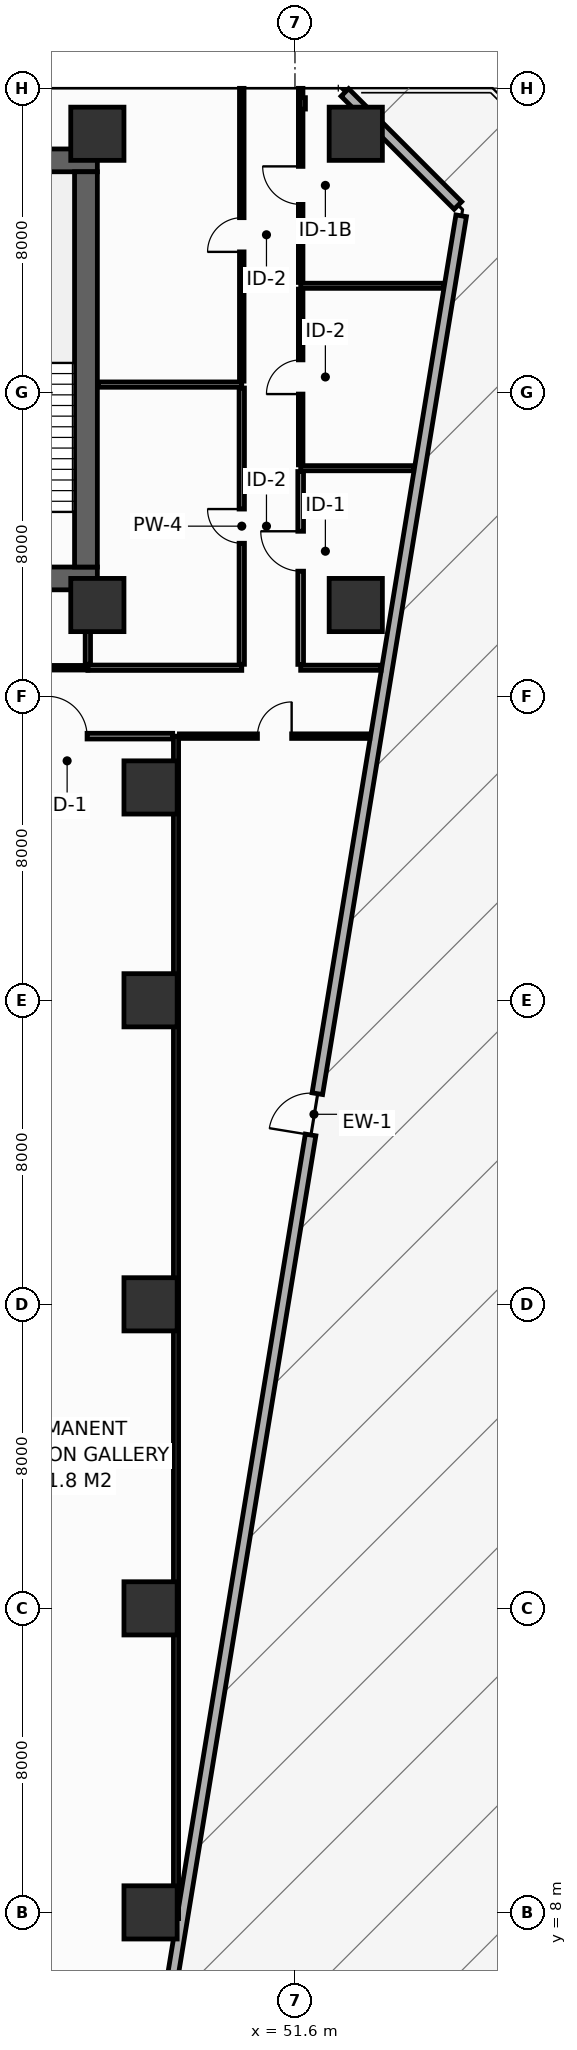
"""IFC4 building model, lengths in metres.
Left out: names, types, materials, properties, quantities, classifications, styles, units other than length and angle.
Written with IfcOpenShell. Run it as: python <this file> out.ifc"""

import sys

from ifc_helpers import new_model, si_unit, direction, frame, frame_2d, origin, origin_2d, place, context, subcontext, project, spatial, rectangle, hollow_rectangle, extrude, element, fill, save


model = new_model("IFC4")
c1 = context("Model", 3, precision=1e-05, world=origin(), true_north=direction((0.0, 1.0)))
c2 = subcontext(c1, "Body", "Model", "MODEL_VIEW")
j1 = project(units=[si_unit("LENGTHUNIT", "METRE"), si_unit("PLANEANGLEUNIT", "RADIAN")], contexts=[c1])
p1 = place(None, origin())
s1 = spatial("IfcSite", under=j1, at=p1, CompositionType="ELEMENT")
p2 = place(p1, origin())
s2 = spatial("IfcBuilding", under=s1, at=p2, CompositionType="ELEMENT")
p3 = place(p2, frame((0.0, 0.0, 27.6)))
s3 = spatial("IfcBuildingStorey", under=s2, at=p3, CompositionType="ELEMENT", Elevation=27.6)
p4 = place(p3, frame((13.5, 43.1, 0.0), z_axis=(0.0, 0.0, 1.0), x_axis=(1.0, 0.0, 0.0)))
e1 = element("IfcWall", 1, at=p4, inside=s3, PredefinedType="SHEAR", context=c2, shape_type="SweptSolid", body=[
    extrude(rectangle(XDim=32.9, YDim=0.6, at=frame_2d((16.45, 0.0))), origin(), (0.0, 0.0, 1.0), 5.15),
])
p5 = place(p4, frame((5.4, 0.0, 0.0)))
e2 = element("IfcOpeningElement", 2, at=p5, cuts=e1, PredefinedType="OPENING", context=c2, shape_type="SweptSolid", body=[
    extrude(rectangle(XDim=1.1, YDim=2.15, at=frame_2d((0.55, 1.075))), frame((0.0, 0.31, 0.0), z_axis=(0.0, -1.0, 0.0), x_axis=(1.0, 0.0, 0.0)), (0.0, 0.0, 1.0), 0.62),
])
p6 = place(p4, frame((25.6, 0.0, 0.0)))
e3 = element("IfcOpeningElement", 3, at=p6, cuts=e1, PredefinedType="OPENING", context=c2, shape_type="SweptSolid", body=[
    extrude(rectangle(XDim=1.1, YDim=2.15, at=frame_2d((0.55, 1.075))), frame((0.0, 0.31, 0.0), z_axis=(0.0, -1.0, 0.0), x_axis=(1.0, 0.0, 0.0)), (0.0, 0.0, 1.0), 0.62),
])
p7 = place(p3, frame((13.5, 54.1, 0.0), z_axis=(0.0, 0.0, 1.0), x_axis=(1.0, 0.0, 0.0)))
e4 = element("IfcWall", 4, at=p7, inside=s3, PredefinedType="SHEAR", context=c2, shape_type="SweptSolid", body=[
    extrude(rectangle(XDim=32.9, YDim=0.6, at=frame_2d((16.45, 0.0))), origin(), (0.0, 0.0, 1.0), 5.15),
])
p8 = place(p3, frame((46.1, 43.4, 0.0), z_axis=(0.0, 0.0, 1.0), x_axis=(0.0, 1.0, 0.0)))
e5 = element("IfcWall", 5, at=p8, inside=s3, PredefinedType="SHEAR", context=c2, shape_type="SweptSolid", body=[
    extrude(rectangle(XDim=10.4, YDim=0.6, at=frame_2d((5.2, 0.0))), origin(), (0.0, 0.0, 1.0), 5.15),
])
for number, where, z_axis, x_axis in (
    (6, (46.4, 54.8, 0.0), (0.0, 0.0, 1.0), (1.0, 0.0, 0.0)),
    (7, (53.2, 54.8, 0.0), (0.0, 0.0, 1.0), (1.0, 0.0, 0.0)),
    (8, (46.4, 42.4, 0.0), (0.0, 0.0, 1.0), (1.0, 0.0, 0.0)),
    (9, (53.2, 42.4, 0.0), (0.0, 0.0, 1.0), (1.0, 0.0, 0.0)),
    (10, (47.8, 8.0, 0.0), (0.0, 0.0, 1.0), (1.0, 0.0, 0.0)),
    (11, (47.8, 16.0, 0.0), (0.0, 0.0, 1.0), (1.0, 0.0, 0.0)),
    (12, (47.8, 24.0, 0.0), (0.0, 0.0, 1.0), (1.0, 0.0, 0.0)),
    (13, (47.8, 32.0, 0.0), (0.0, 0.0, 1.0), (1.0, 0.0, 0.0)),
    (14, (47.8, 37.6, 0.0), (0.0, 0.0, 1.0), (1.0, 0.0, 0.0)),
):
    element("IfcColumn", number, at=place(p3, frame(where, z_axis=z_axis, x_axis=x_axis)), inside=s3, PredefinedType="COLUMN", context=c2, shape_type="SweptSolid", body=[
        extrude(hollow_rectangle(XDim=1.4, YDim=1.4, WallThickness=0.065, at=origin_2d()), origin(), (0.0, 0.0, 1.0), 5.4),
    ])
p9 = place(p3, frame((51.8, 55.6, 0.0), z_axis=(0.0, 0.0, 1.0), x_axis=(1.0, 0.0, 0.0)))
e15 = element("IfcColumn", 15, at=p9, inside=s3, PredefinedType="PILASTER", context=c2, shape_type="SweptSolid", body=[
    extrude(hollow_rectangle(XDim=0.15, YDim=0.3, WallThickness=0.01, at=origin_2d()), origin(), (0.0, 0.0, 1.0), 5.4),
])
p10 = place(p3, frame((48.226, 5.358, 0.0), z_axis=(0.0, 0.0, 1.0), x_axis=(0.161709707857, 0.986838370953, 0.0)))
e16 = element("IfcWall", 16, at=p10, inside=s3, PredefinedType="STANDARD", context=c2, shape_type="SweptSolid", body=[
    extrude(rectangle(XDim=47.915, YDim=0.28, at=frame_2d((23.958, 0.0))), origin(), (0.0, 0.0, 1.0), 5.15),
])
p11 = place(p10, frame((23.407, 0.0, 0.0)))
e17 = element("IfcOpeningElement", 17, at=p11, cuts=e16, PredefinedType="OPENING", context=c2, shape_type="SweptSolid", body=[
    extrude(rectangle(XDim=1.1, YDim=2.2, at=frame_2d((0.55, 1.1))), frame((0.0, 0.15, 0.0), z_axis=(0.0, -1.0, 0.0), x_axis=(1.0, 0.0, 0.0)), (0.0, 0.0, 1.0), 0.3),
])
p12 = place(p3, frame((55.887, 52.913, 0.0), z_axis=(0.0, 0.0, 1.0), x_axis=(-0.707106781187, 0.707106781187, 0.0)))
e18 = element("IfcWall", 18, at=p12, inside=s3, PredefinedType="STANDARD", context=c2, shape_type="SweptSolid", body=[
    extrude(rectangle(XDim=4.206, YDim=0.28, at=frame_2d((2.103, 0.0))), origin(), (0.0, 0.0, 1.0), 5.15),
])
p13 = place(p3, frame((46.15, 40.75, 0.0), z_axis=(0.0, 0.0, 1.0), x_axis=(1.0, 0.0, 0.0)))
e19 = element("IfcWall", 19, at=p13, inside=s3, PredefinedType="PARTITIONING", context=c2, shape_type="SweptSolid", body=[
    extrude(rectangle(XDim=4.05, YDim=0.14, at=frame_2d((2.025, 0.0))), origin(), (0.0, 0.0, 1.0), 5.15),
])
p14 = place(p3, frame((46.15, 40.84, 0.0), z_axis=(0.0, 0.0, 1.0), x_axis=(0.0, 1.0, 0.0)))
e20 = element("IfcWall", 20, at=p14, inside=s3, PredefinedType="PARTITIONING", context=c2, shape_type="SweptSolid", body=[
    extrude(rectangle(XDim=1.94, YDim=0.14, at=frame_2d((0.97, 0.0))), origin(), (0.0, 0.0, 1.0), 5.15),
])
p15 = place(p3, frame((46.42, 48.2, 0.0), z_axis=(0.0, 0.0, 1.0), x_axis=(1.0, 0.0, 0.0)))
e21 = element("IfcWall", 21, at=p15, inside=s3, PredefinedType="PARTITIONING", context=c2, shape_type="SweptSolid", body=[
    extrude(rectangle(XDim=3.78, YDim=0.14, at=frame_2d((1.89, 0.0))), origin(), (0.0, 0.0, 1.0), 5.15),
])
p16 = place(p3, frame((50.2, 40.84, 0.0), z_axis=(0.0, 0.0, 1.0), x_axis=(0.0, 1.0, 0.0)))
e22 = element("IfcWall", 22, at=p16, inside=s3, PredefinedType="PARTITIONING", context=c2, shape_type="SweptSolid", body=[
    extrude(rectangle(XDim=7.27, YDim=0.14, at=frame_2d((3.635, 0.0))), origin(), (0.0, 0.0, 1.0), 4.335),
])
p17 = place(p16, frame((3.185, 0.0, 0.0)))
e23 = element("IfcOpeningElement", 23, at=p17, cuts=e22, PredefinedType="OPENING", context=c2, shape_type="SweptSolid", body=[
    extrude(rectangle(XDim=0.9, YDim=2.1, at=frame_2d((0.45, 1.05))), frame((0.0, 0.08, 0.0), z_axis=(0.0, -1.0, 0.0), x_axis=(1.0, 0.0, 0.0)), (0.0, 0.0, 1.0), 0.16),
])
p18 = place(p3, frame((50.2, 48.29, 0.0), z_axis=(0.0, 0.0, 1.0), x_axis=(0.0, 1.0, 0.0)))
e24 = element("IfcWall", 24, at=p18, inside=s3, PredefinedType="PARTITIONING", context=c2, shape_type="SweptSolid", body=[
    extrude(rectangle(XDim=7.705, YDim=0.12, at=frame_2d((3.853, 0.0))), origin(), (0.0, 0.0, 1.0), 4.435),
])
p19 = place(p18, frame((3.402, 0.0, 0.0)))
e25 = element("IfcOpeningElement", 25, at=p19, cuts=e24, PredefinedType="OPENING", context=c2, shape_type="SweptSolid", body=[
    extrude(rectangle(XDim=0.9, YDim=2.1, at=frame_2d((0.45, 1.05))), frame((0.0, 0.07, 0.0), z_axis=(0.0, -1.0, 0.0), x_axis=(1.0, 0.0, 0.0)), (0.0, 0.0, 1.0), 0.14),
])
p20 = place(p3, frame((51.75, 40.75, 0.0), z_axis=(0.0, 0.0, 1.0), x_axis=(1.0, 0.0, 0.0)))
e26 = element("IfcWall", 26, at=p20, inside=s3, PredefinedType="PARTITIONING", context=c2, shape_type="SweptSolid", body=[
    extrude(rectangle(XDim=2.113, YDim=0.135, at=frame_2d((1.057, 0.0))), origin(), (0.0, 0.0, 1.0), 5.15),
])
p21 = place(p3, frame((51.75, 46.0, 0.0), z_axis=(0.0, 0.0, 1.0), x_axis=(1.0, 0.0, 0.0)))
e27 = element("IfcWall", 27, at=p21, inside=s3, PredefinedType="PARTITIONING", context=c2, shape_type="SweptSolid", body=[
    extrude(rectangle(XDim=2.974, YDim=0.135, at=frame_2d((1.487, 0.0))), origin(), (0.0, 0.0, 1.0), 4.335),
])
p22 = place(p3, frame((51.75, 50.8, 0.0), z_axis=(0.0, 0.0, 1.0), x_axis=(1.0, 0.0, 0.0)))
e28 = element("IfcWall", 28, at=p22, inside=s3, PredefinedType="PARTITIONING", context=c2, shape_type="SweptSolid", body=[
    extrude(rectangle(XDim=3.76, YDim=0.135, at=frame_2d((1.88, 0.0))), origin(), (0.0, 0.0, 1.0), 4.335),
])
p23 = place(p3, frame((51.75, 40.837, 0.0), z_axis=(0.0, 0.0, 1.0), x_axis=(0.0, 1.0, 0.0)))
e29 = element("IfcWall", 29, at=p23, inside=s3, PredefinedType="PARTITIONING", context=c2, shape_type="SweptSolid", body=[
    extrude(rectangle(XDim=5.075, YDim=0.15, at=frame_2d((2.538, 0.0))), origin(), (0.0, 0.0, 1.0), 4.235),
])
p24 = place(p23, frame((2.453, 0.0, 0.0)))
e30 = element("IfcOpeningElement", 30, at=p24, cuts=e29, PredefinedType="OPENING", context=c2, shape_type="SweptSolid", body=[
    extrude(rectangle(XDim=1.05, YDim=2.15, at=frame_2d((0.525, 1.075))), frame((0.0, 0.085, 0.0), z_axis=(0.0, -1.0, 0.0), x_axis=(1.0, 0.0, 0.0)), (0.0, 0.0, 1.0), 0.17),
])
p25 = place(p3, frame((51.75, 46.087, 0.0), z_axis=(0.0, 0.0, 1.0), x_axis=(0.0, 1.0, 0.0)))
e31 = element("IfcWall", 31, at=p25, inside=s3, PredefinedType="PARTITIONING", context=c2, shape_type="SweptSolid", body=[
    extrude(rectangle(XDim=4.625, YDim=0.12, at=frame_2d((2.312, 0.0))), origin(), (0.0, 0.0, 1.0), 5.15),
])
p26 = place(p25, frame((1.863, 0.0, 0.0)))
e32 = element("IfcOpeningElement", 32, at=p26, cuts=e31, PredefinedType="OPENING", context=c2, shape_type="SweptSolid", body=[
    extrude(rectangle(XDim=0.9, YDim=2.1, at=frame_2d((0.45, 1.05))), frame((0.0, 0.07, 0.0), z_axis=(0.0, -1.0, 0.0), x_axis=(1.0, 0.0, 0.0)), (0.0, 0.0, 1.0), 0.14),
])
p27 = place(p3, frame((51.75, 50.887, 0.0), z_axis=(0.0, 0.0, 1.0), x_axis=(0.0, 1.0, 0.0)))
e33 = element("IfcWall", 33, at=p27, inside=s3, PredefinedType="PARTITIONING", context=c2, shape_type="SweptSolid", body=[
    extrude(rectangle(XDim=5.108, YDim=0.12, at=frame_2d((2.554, 0.0))), origin(), (0.0, 0.0, 1.0), 4.435),
])
p28 = place(p27, frame((2.054, 0.0, 0.0)))
e34 = element("IfcOpeningElement", 34, at=p28, cuts=e33, PredefinedType="OPENING", context=c2, shape_type="SweptSolid", body=[
    extrude(rectangle(XDim=1.0, YDim=2.15, at=frame_2d((0.5, 1.075))), frame((0.0, 0.07, 0.0), z_axis=(0.0, -1.0, 0.0), x_axis=(1.0, 0.0, 0.0)), (0.0, 0.0, 1.0), 0.14),
])
p29 = place(p3, frame((40.995, 40.75, 0.0), z_axis=(0.0, 0.0, 1.0), x_axis=(1.0, 0.0, 0.0)))
e35 = element("IfcWall", 35, at=p29, inside=s3, PredefinedType="PARTITIONING", context=c2, shape_type="SweptSolid", body=[
    extrude(rectangle(XDim=5.155, YDim=0.12, at=frame_2d((2.577, 0.0))), origin(), (0.0, 0.0, 1.0), 5.15),
])
p30 = place(p29, frame((2.128, 0.0, 0.0)))
e36 = element("IfcOpeningElement", 36, at=p30, cuts=e35, PredefinedType="OPENING", context=c2, shape_type="SweptSolid", body=[
    extrude(rectangle(XDim=0.9, YDim=2.1, at=frame_2d((0.45, 1.05))), frame((0.0, 0.07, 0.0), z_axis=(0.0, -1.0, 0.0), x_axis=(1.0, 0.0, 0.0)), (0.0, 0.0, 1.0), 0.14),
])
p31 = place(p3, frame((48.47, 7.837, 0.0), z_axis=(0.0, 0.0, 1.0), x_axis=(0.0, 1.0, 0.0)))
e37 = element("IfcWall", 37, at=p31, inside=s3, PredefinedType="PARTITIONING", context=c2, shape_type="SweptSolid", body=[
    extrude(rectangle(XDim=31.113, YDim=0.135, at=frame_2d((15.557, 0.0))), origin(), (0.0, 0.0, 1.0), 4.235),
])
p32 = place(p3, frame((42.827, 38.95, 0.0), z_axis=(0.0, 0.0, 1.0), x_axis=(1.0, 0.0, 0.0)))
e38 = element("IfcWall", 38, at=p32, inside=s3, PredefinedType="PARTITIONING", context=c2, shape_type="SweptSolid", body=[
    extrude(rectangle(XDim=5.555, YDim=0.15, at=frame_2d((2.778, 0.0))), origin(), (0.0, 0.0, 1.0), 5.15),
])
p33 = place(p32, frame((2.252, 0.0, 0.0)))
e39 = element("IfcOpeningElement", 39, at=p33, cuts=e38, PredefinedType="OPENING", context=c2, shape_type="SweptSolid", body=[
    extrude(rectangle(XDim=1.05, YDim=2.15, at=frame_2d((0.525, 1.075))), frame((0.0, 0.085, 0.0), z_axis=(0.0, -1.0, 0.0), x_axis=(1.0, 0.0, 0.0)), (0.0, 0.0, 1.0), 0.17),
])
p34 = place(p3, frame((48.558, 38.95, 0.0), z_axis=(0.0, 0.0, 1.0), x_axis=(1.0, 0.0, 0.0)))
e40 = element("IfcWall", 40, at=p34, inside=s3, PredefinedType="PARTITIONING", context=c2, shape_type="SweptSolid", body=[
    extrude(rectangle(XDim=5.011, YDim=0.12, at=frame_2d((2.505, 0.0))), origin(), (0.0, 0.0, 1.0), 4.235),
])
p35 = place(p34, frame((2.055, 0.0, 0.0)))
e41 = element("IfcOpeningElement", 41, at=p35, cuts=e40, PredefinedType="OPENING", context=c2, shape_type="SweptSolid", body=[
    extrude(rectangle(XDim=0.9, YDim=2.1, at=frame_2d((0.45, 1.05))), frame((0.0, 0.07, 0.0), z_axis=(0.0, -1.0, 0.0), x_axis=(1.0, 0.0, 0.0)), (0.0, 0.0, 1.0), 0.14),
])
p36 = place(p11, origin())
e42 = element("IfcDoor", 42, at=p36, inside=s3, OperationType="SINGLE_SWING_LEFT", PredefinedType="DOOR", context=c2, shape_type="SweptSolid", body=[
    extrude(rectangle(XDim=1.1, YDim=2.2, at=frame_2d((0.55, 1.1))), frame((0.0, 0.025, 0.0), z_axis=(0.0, -1.0, 0.0), x_axis=(1.0, 0.0, 0.0)), (0.0, 0.0, 1.0), 0.05),
])
fill(e17, e42)
p37 = place(p17, origin())
e43 = element("IfcDoor", 43, at=p37, inside=s3, OperationType="SINGLE_SWING_RIGHT", PredefinedType="DOOR", context=c2, shape_type="SweptSolid", body=[
    extrude(rectangle(XDim=0.9, YDim=2.1, at=frame_2d((0.45, 1.05))), frame((0.0, 0.025, 0.0), z_axis=(0.0, -1.0, 0.0), x_axis=(1.0, 0.0, 0.0)), (0.0, 0.0, 1.0), 0.05),
])
fill(e23, e43)
p38 = place(p19, origin())
e44 = element("IfcDoor", 44, at=p38, inside=s3, OperationType="SINGLE_SWING_LEFT", PredefinedType="DOOR", context=c2, shape_type="SweptSolid", body=[
    extrude(rectangle(XDim=0.9, YDim=2.1, at=frame_2d((0.45, 1.05))), frame((0.0, 0.025, 0.0), z_axis=(0.0, -1.0, 0.0), x_axis=(1.0, 0.0, 0.0)), (0.0, 0.0, 1.0), 0.05),
])
fill(e25, e44)
p39 = place(p24, origin())
e45 = element("IfcDoor", 45, at=p39, inside=s3, OperationType="SINGLE_SWING_RIGHT", PredefinedType="DOOR", context=c2, shape_type="SweptSolid", body=[
    extrude(rectangle(XDim=1.05, YDim=2.15, at=frame_2d((0.525, 1.075))), frame((0.0, 0.025, 0.0), z_axis=(0.0, -1.0, 0.0), x_axis=(1.0, 0.0, 0.0)), (0.0, 0.0, 1.0), 0.05),
])
fill(e30, e45)
p40 = place(p26, origin())
e46 = element("IfcDoor", 46, at=p40, inside=s3, OperationType="SINGLE_SWING_LEFT", PredefinedType="DOOR", context=c2, shape_type="SweptSolid", body=[
    extrude(rectangle(XDim=0.9, YDim=2.1, at=frame_2d((0.45, 1.05))), frame((0.0, 0.025, 0.0), z_axis=(0.0, -1.0, 0.0), x_axis=(1.0, 0.0, 0.0)), (0.0, 0.0, 1.0), 0.05),
])
fill(e32, e46)
p41 = place(p28, origin())
e47 = element("IfcDoor", 47, at=p41, inside=s3, OperationType="SINGLE_SWING_RIGHT", PredefinedType="DOOR", context=c2, shape_type="SweptSolid", body=[
    extrude(rectangle(XDim=1.0, YDim=2.15, at=frame_2d((0.5, 1.075))), frame((0.0, 0.025, 0.0), z_axis=(0.0, -1.0, 0.0), x_axis=(1.0, 0.0, 0.0)), (0.0, 0.0, 1.0), 0.05),
])
fill(e34, e47)
p42 = place(p33, origin())
e48 = element("IfcDoor", 48, at=p42, inside=s3, OperationType="SINGLE_SWING_LEFT", PredefinedType="DOOR", context=c2, shape_type="SweptSolid", body=[
    extrude(rectangle(XDim=1.05, YDim=2.15, at=frame_2d((0.525, 1.075))), frame((0.0, 0.025, 0.0), z_axis=(0.0, -1.0, 0.0), x_axis=(1.0, 0.0, 0.0)), (0.0, 0.0, 1.0), 0.05),
])
fill(e39, e48)
p43 = place(p35, origin())
e49 = element("IfcDoor", 49, at=p43, inside=s3, OperationType="SINGLE_SWING_RIGHT", PredefinedType="DOOR", context=c2, shape_type="SweptSolid", body=[
    extrude(rectangle(XDim=0.9, YDim=2.1, at=frame_2d((0.45, 1.05))), frame((0.0, 0.025, 0.0), z_axis=(0.0, -1.0, 0.0), x_axis=(1.0, 0.0, 0.0)), (0.0, 0.0, 1.0), 0.05),
])
fill(e41, e49)
save(model, sys.argv[1])
